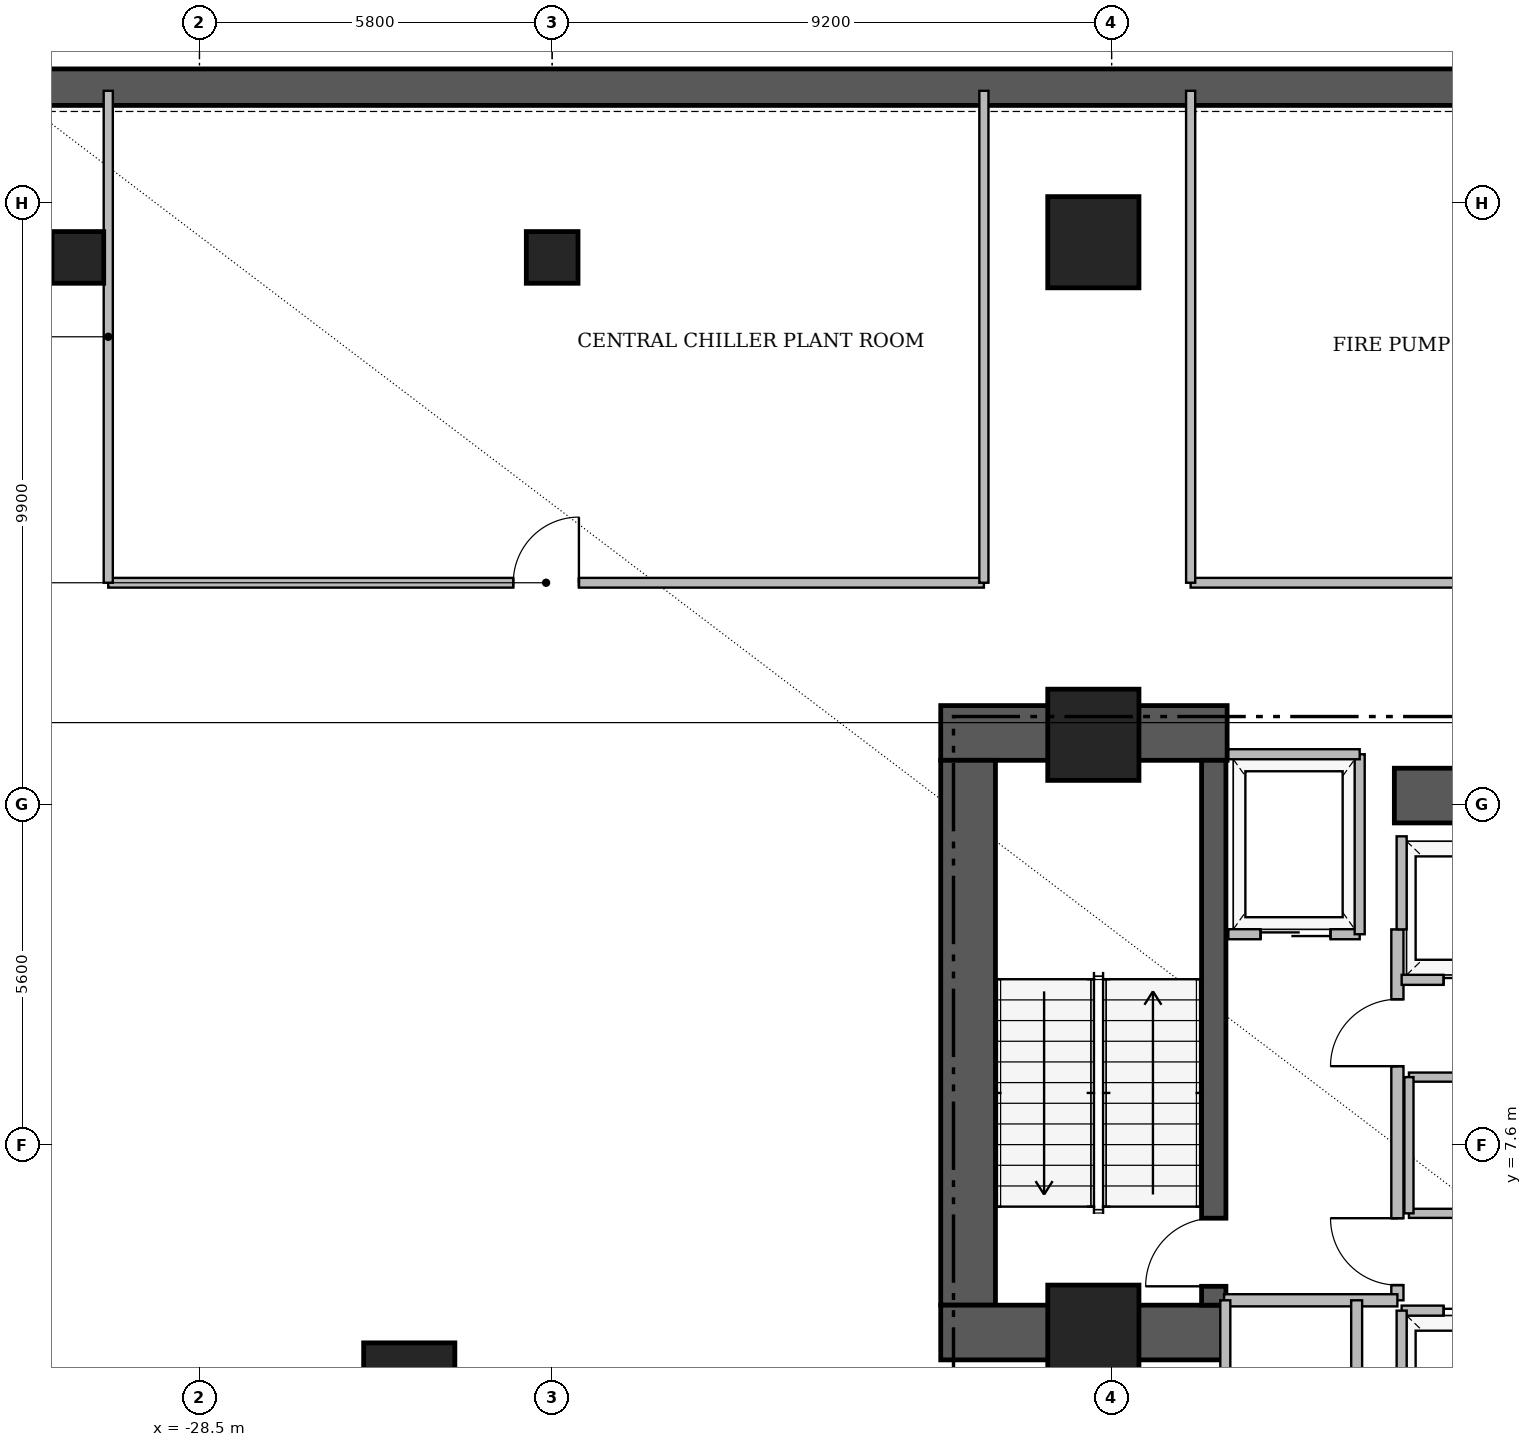
"""IFC4 building model, lengths in metres.
Left out: names, types, materials, properties, quantities, classifications, styles, units other than length and angle.
Written with IfcOpenShell. Run it as: python <this file> out.ifc"""

import sys

from ifc_helpers import new_model, si_unit, direction, frame, frame_2d, origin, origin_2d, place, context, subcontext, project, spatial, rectangle, extrude, element, fill, save


model = new_model("IFC4")
c1 = context("Model", 3, precision=1e-05, world=origin(), true_north=direction((0.0, 1.0)))
c2 = subcontext(c1, "Body", "Model", "MODEL_VIEW")
j1 = project(units=[si_unit("LENGTHUNIT", "METRE"), si_unit("PLANEANGLEUNIT", "RADIAN")], contexts=[c1])
p1 = place(None, origin())
s1 = spatial("IfcSite", under=j1, at=p1, CompositionType="ELEMENT")
p2 = place(p1, origin())
s2 = spatial("IfcBuilding", under=s1, at=p2, CompositionType="ELEMENT")
p3 = place(p2, frame((0.0, 0.0, -9.0)))
s3 = spatial("IfcBuildingStorey", under=s2, at=p3, CompositionType="ELEMENT", Elevation=-9.0)
p4 = place(p3, frame((-36.3, 25.0, 0.0), z_axis=(0.0, 0.0, 1.0), x_axis=(1.0, 0.0, 0.0)))
e1 = element("IfcWall", 1, at=p4, inside=s3, PredefinedType="USERDEFINED", context=c2, shape_type="SweptSolid", body=[
    extrude(rectangle(XDim=72.6, YDim=0.6, at=frame_2d((36.3, 0.0))), origin(), (0.0, 0.0, 1.0), 4.24),
])
p5 = place(p3, frame((-16.31, 14.38, 0.0), z_axis=(0.0, 0.0, 1.0), x_axis=(1.0, 0.0, 0.0)))
e2 = element("IfcWall", 2, at=p5, inside=s3, PredefinedType="SHEAR", context=c2, shape_type="SweptSolid", body=[
    extrude(rectangle(XDim=4.71, YDim=0.9, at=frame_2d((2.355, 0.0))), origin(), (0.0, 0.0, 1.0), 4.31),
])
p6 = place(p3, frame((-15.86, 4.97, 0.0), z_axis=(0.0, 0.0, 1.0), x_axis=(0.0, 1.0, 0.0)))
e3 = element("IfcWall", 3, at=p6, inside=s3, PredefinedType="SHEAR", context=c2, shape_type="SweptSolid", body=[
    extrude(rectangle(XDim=8.96, YDim=0.9, at=frame_2d((4.48, 0.0))), origin(), (0.0, 0.0, 1.0), 4.31),
])
p7 = place(p3, frame((-16.31, 4.52, 0.0), z_axis=(0.0, 0.0, 1.0), x_axis=(1.0, 0.0, 0.0)))
e4 = element("IfcWall", 4, at=p7, inside=s3, PredefinedType="SHEAR", context=c2, shape_type="SweptSolid", body=[
    extrude(rectangle(XDim=4.71, YDim=0.9, at=frame_2d((2.355, 0.0))), origin(), (0.0, 0.0, 1.0), 4.31),
])
p8 = place(p3, frame((-8.85, 13.35, 0.0), z_axis=(0.0, 0.0, 1.0), x_axis=(1.0, 0.0, 0.0)))
e5 = element("IfcWall", 5, at=p8, inside=s3, PredefinedType="SHEAR", context=c2, shape_type="SweptSolid", body=[
    extrude(rectangle(XDim=7.6, YDim=0.9, at=frame_2d((3.8, 0.0))), origin(), (0.0, 0.0, 1.0), 4.24),
])
p9 = place(p3, frame((-11.82, 4.97, 0.0), z_axis=(0.0, 0.0, 1.0), x_axis=(0.0, 1.0, 0.0)))
e6 = element("IfcWall", 6, at=p9, inside=s3, PredefinedType="SHEAR", context=c2, shape_type="SweptSolid", body=[
    extrude(rectangle(XDim=8.96, YDim=0.4, at=frame_2d((4.48, 0.0))), origin(), (0.0, 0.0, 1.0), 4.31),
])
p10 = place(p9, frame((0.31, 0.0, 0.0)))
e7 = element("IfcOpeningElement", 7, at=p10, cuts=e6, PredefinedType="OPENING", context=c2, shape_type="SweptSolid", body=[
    extrude(rectangle(XDim=1.12, YDim=2.22, at=frame_2d((0.56, 1.11))), frame((0.0, 0.21, 0.0), z_axis=(0.0, -1.0, 0.0), x_axis=(1.0, 0.0, 0.0)), (0.0, 0.0, 1.0), 0.42),
])
for number, where, z_axis, x_axis in (
    (8, (-13.8, 14.35, 0.0), (0.0, 0.0, 1.0), (1.0, 0.0, 0.0)),
    (9, (-13.8, 4.55, 0.0), (0.0, 0.0, 1.0), (1.0, 0.0, 0.0)),
    (10, (-13.8, 22.45, 0.0), (0.0, 0.0, 1.0), (1.0, 0.0, 0.0)),
    (11, (-25.05, 3.6, 0.0), (0.0, 0.0, 1.0), (1.0, 0.0, 0.0)),
):
    element("IfcColumn", number, at=place(p3, frame(where, z_axis=z_axis, x_axis=x_axis)), inside=s3, PredefinedType="COLUMN", context=c2, shape_type="SweptSolid", body=[
        extrude(rectangle(XDim=1.5, YDim=1.5, at=origin_2d()), origin(), (0.0, 0.0, 1.0), 4.5),
    ])
for number, where, z_axis, x_axis in (
    (12, (-30.5, 22.2, 0.0), (0.0, 0.0, 1.0), (1.0, 0.0, 0.0)),
    (13, (-22.7, 22.2, 0.0), (0.0, 0.0, 1.0), (1.0, 0.0, 0.0)),
):
    element("IfcColumn", number, at=place(p3, frame(where, z_axis=z_axis, x_axis=x_axis)), inside=s3, PredefinedType="COLUMN", context=c2, shape_type="SweptSolid", body=[
        extrude(rectangle(XDim=0.85, YDim=0.85, at=origin_2d()), origin(), (0.0, 0.0, 1.0), 4.5),
    ])
p11 = place(p3, frame((-8.8, 5.05, 0.0), z_axis=(0.0, 0.0, 1.0), x_axis=(0.0, 1.0, 0.0)))
e14 = element("IfcWall", 14, at=p11, inside=s3, PredefinedType="PARTITIONING", context=c2, shape_type="SweptSolid", body=[
    extrude(rectangle(XDim=6.1, YDim=0.2, at=frame_2d((3.05, 0.0))), origin(), (0.0, 0.0, 1.0), 4.24),
])
p12 = place(p11, frame((0.25, 0.0, 0.0)))
e15 = element("IfcOpeningElement", 15, at=p12, cuts=e14, PredefinedType="OPENING", context=c2, shape_type="SweptSolid", body=[
    extrude(rectangle(XDim=1.1, YDim=2.2, at=frame_2d((0.55, 1.1))), frame((0.0, 0.11, 0.0), z_axis=(0.0, -1.0, 0.0), x_axis=(1.0, 0.0, 0.0)), (0.0, 0.0, 1.0), 0.22),
])
p13 = place(p11, frame((3.85, 0.0, 0.0)))
e16 = element("IfcOpeningElement", 16, at=p13, cuts=e14, PredefinedType="OPENING", context=c2, shape_type="SweptSolid", body=[
    extrude(rectangle(XDim=1.1, YDim=2.2, at=frame_2d((0.55, 1.1))), frame((0.0, 0.11, 0.0), z_axis=(0.0, -1.0, 0.0), x_axis=(1.0, 0.0, 0.0)), (0.0, 0.0, 1.0), 0.22),
])
p14 = place(p3, frame((-11.58, 11.07, 0.0), z_axis=(0.0, 0.0, 1.0), x_axis=(1.0, 0.0, 0.0)))
e17 = element("IfcWall", 17, at=p14, inside=s3, PredefinedType="PARTITIONING", context=c2, shape_type="SweptSolid", body=[
    extrude(rectangle(XDim=2.16, YDim=0.165, at=frame_2d((1.08, 0.0))), origin(), (0.0, 0.0, 1.0), 4.24),
])
p15 = place(p14, frame((0.53, 0.0, 0.0)))
e18 = element("IfcOpeningElement", 18, at=p15, cuts=e17, PredefinedType="OPENING", context=c2, shape_type="SweptSolid", body=[
    extrude(rectangle(XDim=1.15, YDim=2.25, at=frame_2d((0.575, 1.125))), frame((0.0, 0.093, 0.0), z_axis=(0.0, -1.0, 0.0), x_axis=(1.0, 0.0, 0.0)), (0.0, 0.0, 1.0), 0.185),
])
p16 = place(p3, frame((-8.73, 4.88, 0.0), z_axis=(0.0, 0.0, 1.0), x_axis=(1.0, 0.0, 0.0)))
e19 = element("IfcWall", 19, at=p16, inside=s3, PredefinedType="PARTITIONING", context=c2, shape_type="SweptSolid", body=[
    extrude(rectangle(XDim=2.48, YDim=0.165, at=frame_2d((1.24, 0.0))), origin(), (0.0, 0.0, 1.0), 4.24),
])
p17 = place(p16, frame((0.69, 0.0, 0.0)))
e20 = element("IfcOpeningElement", 20, at=p17, cuts=e19, PredefinedType="OPENING", context=c2, shape_type="SweptSolid", body=[
    extrude(rectangle(XDim=1.1, YDim=2.25, at=frame_2d((0.55, 1.125))), frame((0.0, 0.093, 0.0), z_axis=(0.0, -1.0, 0.0), x_axis=(1.0, 0.0, 0.0)), (0.0, 0.0, 1.0), 0.185),
])
p18 = place(p3, frame((-8.73, 10.32, 0.0), z_axis=(0.0, 0.0, 1.0), x_axis=(1.0, 0.0, 0.0)))
e21 = element("IfcWall", 21, at=p18, inside=s3, PredefinedType="PARTITIONING", context=c2, shape_type="SweptSolid", body=[
    extrude(rectangle(XDim=2.48, YDim=0.165, at=frame_2d((1.24, 0.0))), origin(), (0.0, 0.0, 1.0), 4.24),
])
p19 = place(p18, frame((0.69, 0.0, 0.0)))
e22 = element("IfcOpeningElement", 22, at=p19, cuts=e21, PredefinedType="OPENING", context=c2, shape_type="SweptSolid", body=[
    extrude(rectangle(XDim=1.1, YDim=2.25, at=frame_2d((0.55, 1.125))), frame((0.0, 0.093, 0.0), z_axis=(0.0, -1.0, 0.0), x_axis=(1.0, 0.0, 0.0)), (0.0, 0.0, 1.0), 0.185),
])
p20 = place(p3, frame((-8.61, 6.48, 0.0), z_axis=(0.0, 0.0, 1.0), x_axis=(1.0, 0.0, 0.0)))
e23 = element("IfcWall", 23, at=p20, inside=s3, PredefinedType="PARTITIONING", context=c2, shape_type="SweptSolid", body=[
    extrude(rectangle(XDim=7.29, YDim=0.15, at=frame_2d((3.645, 0.0))), origin(), (0.0, 0.0, 1.0), 4.24),
])
p21 = place(p20, frame((3.195, 0.0, 0.0)))
e24 = element("IfcOpeningElement", 24, at=p21, cuts=e23, PredefinedType="OPENING", context=c2, shape_type="SweptSolid", body=[
    extrude(rectangle(XDim=0.9, YDim=2.15, at=frame_2d((0.45, 1.075))), frame((0.0, 0.085, 0.0), z_axis=(0.0, -1.0, 0.0), x_axis=(1.0, 0.0, 0.0)), (0.0, 0.0, 1.0), 0.17),
])
p22 = place(p3, frame((-30.0, 16.85, 0.0), z_axis=(0.0, 0.0, 1.0), x_axis=(1.0, 0.0, 0.0)))
e25 = element("IfcWall", 25, at=p22, inside=s3, PredefinedType="PARTITIONING", context=c2, shape_type="SweptSolid", body=[
    extrude(rectangle(XDim=14.4, YDim=0.16, at=frame_2d((7.2, 0.0))), origin(), (0.0, 0.0, 1.0), 4.24),
])
p23 = place(p22, frame((6.66, 0.0, 0.0)))
e26 = element("IfcOpeningElement", 26, at=p23, cuts=e25, PredefinedType="OPENING", context=c2, shape_type="SweptSolid", body=[
    extrude(rectangle(XDim=1.08, YDim=2.18, at=frame_2d((0.54, 1.09))), frame((0.0, 0.09, 0.0), z_axis=(0.0, -1.0, 0.0), x_axis=(1.0, 0.0, 0.0)), (0.0, 0.0, 1.0), 0.18),
])
p24 = place(p3, frame((-12.2, 16.85, 0.0), z_axis=(0.0, 0.0, 1.0), x_axis=(1.0, 0.0, 0.0)))
e27 = element("IfcWall", 27, at=p24, inside=s3, PredefinedType="PARTITIONING", context=c2, shape_type="SweptSolid", body=[
    extrude(rectangle(XDim=11.6, YDim=0.16, at=frame_2d((5.8, 0.0))), origin(), (0.0, 0.0, 1.0), 3.707),
])
p25 = place(p24, frame((9.41, 0.0, 0.0)))
e28 = element("IfcOpeningElement", 28, at=p25, cuts=e27, PredefinedType="OPENING", context=c2, shape_type="SweptSolid", body=[
    extrude(rectangle(XDim=1.08, YDim=2.18, at=frame_2d((0.54, 1.09))), frame((0.0, 0.09, 0.0), z_axis=(0.0, -1.0, 0.0), x_axis=(1.0, 0.0, 0.0)), (0.0, 0.0, 1.0), 0.18),
])
p26 = place(p3, frame((-11.65, 5.05, 0.0), z_axis=(0.0, 0.0, 1.0), x_axis=(1.0, 0.0, 0.0)))
e29 = element("IfcWall", 29, at=p26, inside=s3, PredefinedType="PARTITIONING", context=c2, shape_type="SweptSolid", body=[
    extrude(rectangle(XDim=2.85, YDim=0.2, at=frame_2d((1.425, 0.0))), origin(), (0.0, 0.0, 1.0), 4.24),
])
p27 = place(p3, frame((-9.42, 11.07, 0.0), z_axis=(0.0, 0.0, 1.0), x_axis=(0.0, 1.0, 0.0)))
e30 = element("IfcWall", 30, at=p27, inside=s3, PredefinedType="PARTITIONING", context=c2, shape_type="SweptSolid", body=[
    extrude(rectangle(XDim=2.96, YDim=0.165, at=frame_2d((1.48, 0.0))), origin(), (0.0, 0.0, 1.0), 4.24),
])
p28 = place(p3, frame((-11.58, 14.03, 0.0), z_axis=(0.0, 0.0, 1.0), x_axis=(1.0, 0.0, 0.0)))
e31 = element("IfcWall", 31, at=p28, inside=s3, PredefinedType="PARTITIONING", context=c2, shape_type="SweptSolid", body=[
    extrude(rectangle(XDim=2.16, YDim=0.165, at=frame_2d((1.08, 0.0))), origin(), (0.0, 0.0, 1.0), 4.24),
])
p29 = place(p3, frame((-8.73, 2.52, 0.0), z_axis=(0.0, 0.0, 1.0), x_axis=(0.0, 1.0, 0.0)))
e32 = element("IfcWall", 32, at=p29, inside=s3, PredefinedType="PARTITIONING", context=c2, shape_type="SweptSolid", body=[
    extrude(rectangle(XDim=2.36, YDim=0.165, at=frame_2d((1.18, 0.0))), origin(), (0.0, 0.0, 1.0), 4.24),
])
p30 = place(p3, frame((-8.73, 11.15, 0.0), z_axis=(0.0, 0.0, 1.0), x_axis=(0.0, 1.0, 0.0)))
e33 = element("IfcWall", 33, at=p30, inside=s3, PredefinedType="PARTITIONING", context=c2, shape_type="SweptSolid", body=[
    extrude(rectangle(XDim=1.53, YDim=0.165, at=frame_2d((0.765, 0.0))), origin(), (0.0, 0.0, 1.0), 4.24),
])
p31 = place(p3, frame((-9.47, 2.45, 0.0), z_axis=(0.0, 0.0, 1.0), x_axis=(0.0, 1.0, 0.0)))
e34 = element("IfcWall", 34, at=p31, inside=s3, PredefinedType="PARTITIONING", context=c2, shape_type="SweptSolid", body=[
    extrude(rectangle(XDim=2.6, YDim=0.18, at=frame_2d((1.3, 0.0))), origin(), (0.0, 0.0, 1.0), 4.24),
])
p32 = place(p3, frame((-11.63, 2.47, 0.0), z_axis=(0.0, 0.0, 1.0), x_axis=(0.0, 1.0, 0.0)))
e35 = element("IfcWall", 35, at=p32, inside=s3, PredefinedType="PARTITIONING", context=c2, shape_type="SweptSolid", body=[
    extrude(rectangle(XDim=2.58, YDim=0.165, at=frame_2d((1.29, 0.0))), origin(), (0.0, 0.0, 1.0), 4.24),
])
p33 = place(p3, frame((-8.61, 8.72, 0.0), z_axis=(0.0, 0.0, 1.0), x_axis=(1.0, 0.0, 0.0)))
e36 = element("IfcWall", 36, at=p33, inside=s3, PredefinedType="PARTITIONING", context=c2, shape_type="SweptSolid", body=[
    extrude(rectangle(XDim=7.29, YDim=0.15, at=frame_2d((3.645, 0.0))), origin(), (0.0, 0.0, 1.0), 4.24),
])
p34 = place(p3, frame((-8.61, 6.48, 0.0), z_axis=(0.0, 0.0, 1.0), x_axis=(0.0, 1.0, 0.0)))
e37 = element("IfcWall", 37, at=p34, inside=s3, PredefinedType="PARTITIONING", context=c2, shape_type="SweptSolid", body=[
    extrude(rectangle(XDim=2.24, YDim=0.15, at=frame_2d((1.12, 0.0))), origin(), (0.0, 0.0, 1.0), 4.24),
])
for number, where, z_axis, x_axis in (
    (38, (-30.0, 16.85, 0.0), (0.0, 0.0, 1.0), (0.0, 1.0, 0.0)),
    (39, (-15.6, 16.85, 0.0), (0.0, 0.0, 1.0), (0.0, 1.0, 0.0)),
    (40, (-12.2, 16.85, 0.0), (0.0, 0.0, 1.0), (0.0, 1.0, 0.0)),
):
    element("IfcWall", number, at=place(p3, frame(where, z_axis=z_axis, x_axis=x_axis)), inside=s3, PredefinedType="PARTITIONING", context=c2, shape_type="SweptSolid", body=[
        extrude(rectangle(XDim=8.09, YDim=0.15, at=frame_2d((4.045, 0.0))), origin(), (0.0, 0.0, 1.0), 4.24),
    ])
p35 = place(p10, origin())
e41 = element("IfcDoor", 41, at=p35, inside=s3, OperationType="SINGLE_SWING_LEFT", PredefinedType="DOOR", context=c2, shape_type="SweptSolid", body=[
    extrude(rectangle(XDim=1.12, YDim=2.22, at=frame_2d((0.56, 1.11))), frame((0.0, 0.025, 0.0), z_axis=(0.0, -1.0, 0.0), x_axis=(1.0, 0.0, 0.0)), (0.0, 0.0, 1.0), 0.05),
])
fill(e7, e41)
p36 = place(p12, origin())
e42 = element("IfcDoor", 42, at=p36, inside=s3, OperationType="SINGLE_SWING_RIGHT", PredefinedType="DOOR", context=c2, shape_type="SweptSolid", body=[
    extrude(rectangle(XDim=1.1, YDim=2.2, at=frame_2d((0.55, 1.1))), frame((0.0, 0.025, 0.0), z_axis=(0.0, -1.0, 0.0), x_axis=(1.0, 0.0, 0.0)), (0.0, 0.0, 1.0), 0.05),
])
fill(e15, e42)
p37 = place(p13, origin())
e43 = element("IfcDoor", 43, at=p37, inside=s3, OperationType="SINGLE_SWING_LEFT", PredefinedType="DOOR", context=c2, shape_type="SweptSolid", body=[
    extrude(rectangle(XDim=1.1, YDim=2.2, at=frame_2d((0.55, 1.1))), frame((0.0, 0.025, 0.0), z_axis=(0.0, -1.0, 0.0), x_axis=(1.0, 0.0, 0.0)), (0.0, 0.0, 1.0), 0.05),
])
fill(e16, e43)
p38 = place(p15, origin())
e44 = element("IfcDoor", 44, at=p38, inside=s3, OperationType="SLIDING_TO_LEFT", PredefinedType="DOOR", context=c2, shape_type="SweptSolid", body=[
    extrude(rectangle(XDim=1.15, YDim=2.25, at=frame_2d((0.575, 1.125))), frame((0.0, 0.025, 0.0), z_axis=(0.0, -1.0, 0.0), x_axis=(1.0, 0.0, 0.0)), (0.0, 0.0, 1.0), 0.05),
])
fill(e18, e44)
p39 = place(p17, origin())
e45 = element("IfcDoor", 45, at=p39, inside=s3, OperationType="SLIDING_TO_LEFT", PredefinedType="DOOR", context=c2, shape_type="SweptSolid", body=[
    extrude(rectangle(XDim=1.1, YDim=2.25, at=frame_2d((0.55, 1.125))), frame((0.0, 0.025, 0.0), z_axis=(0.0, -1.0, 0.0), x_axis=(1.0, 0.0, 0.0)), (0.0, 0.0, 1.0), 0.05),
])
fill(e20, e45)
p40 = place(p19, origin())
e46 = element("IfcDoor", 46, at=p40, inside=s3, OperationType="SLIDING_TO_LEFT", PredefinedType="DOOR", context=c2, shape_type="SweptSolid", body=[
    extrude(rectangle(XDim=1.1, YDim=2.25, at=frame_2d((0.55, 1.125))), frame((0.0, 0.025, 0.0), z_axis=(0.0, -1.0, 0.0), x_axis=(1.0, 0.0, 0.0)), (0.0, 0.0, 1.0), 0.05),
])
fill(e22, e46)
p41 = place(p23, origin())
e47 = element("IfcDoor", 47, at=p41, inside=s3, OperationType="SINGLE_SWING_RIGHT", PredefinedType="DOOR", context=c2, shape_type="SweptSolid", body=[
    extrude(rectangle(XDim=1.08, YDim=2.18, at=frame_2d((0.54, 1.09))), frame((0.0, 0.025, 0.0), z_axis=(0.0, -1.0, 0.0), x_axis=(1.0, 0.0, 0.0)), (0.0, 0.0, 1.0), 0.05),
])
fill(e26, e47)
save(model, sys.argv[1])
